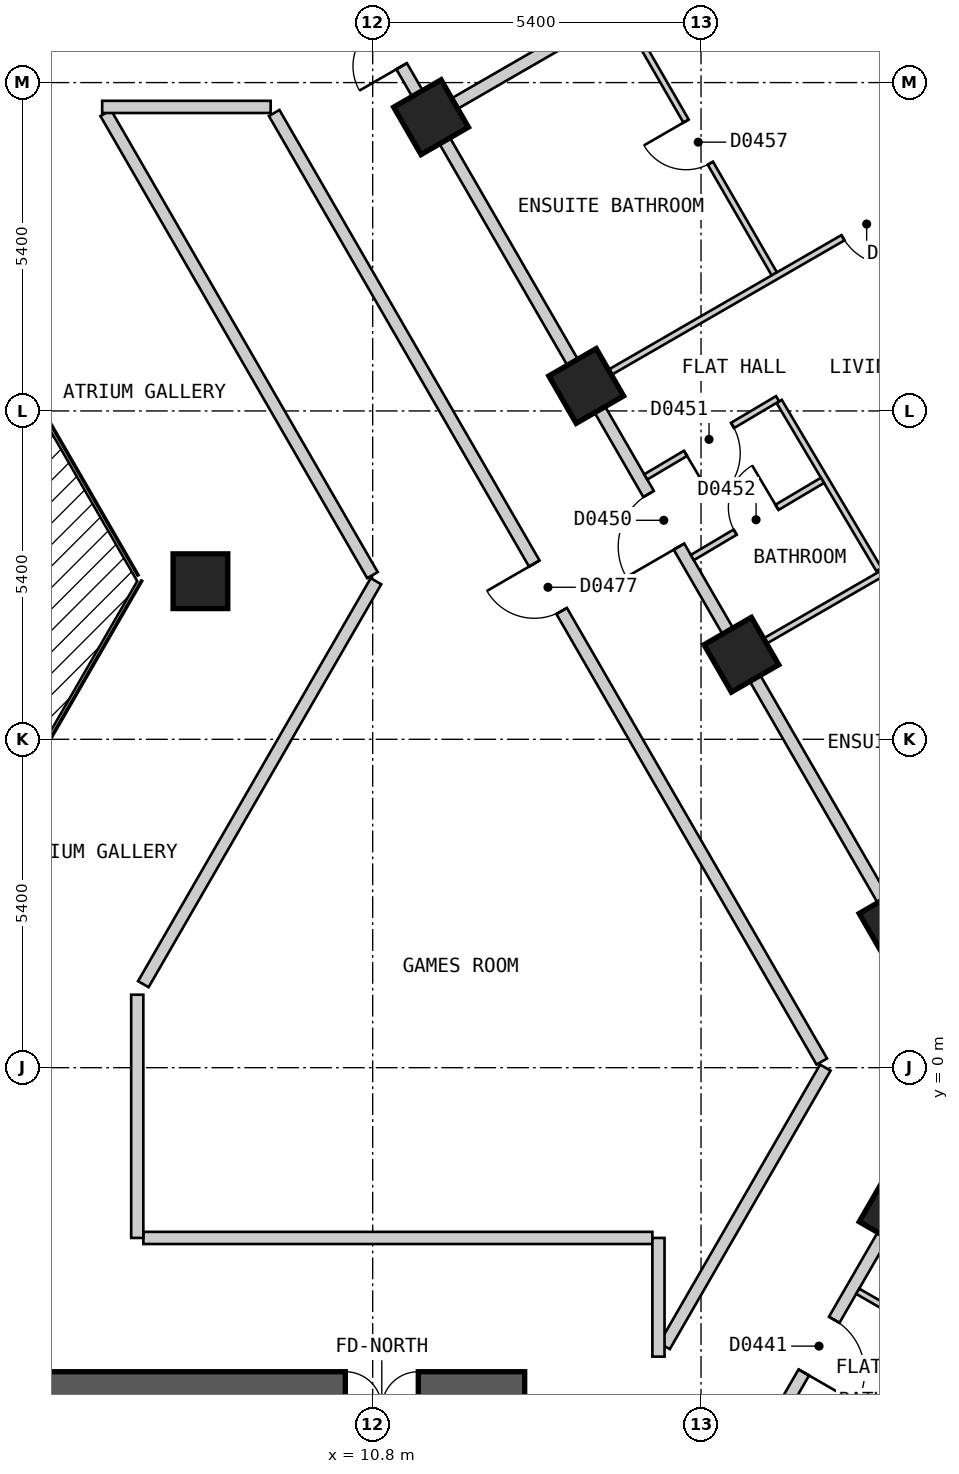
"""IFC4 building model, lengths in metres.
Left out: names, types, materials, properties, quantities, classifications, styles, units other than length and angle.
Written with IfcOpenShell. Run it as: python <this file> out.ifc"""

import sys

from ifc_helpers import new_model, si_unit, direction, frame, frame_2d, origin, origin_2d, place, context, subcontext, project, spatial, polyline, rectangle, outline, extrude, element, fill, save


model = new_model("IFC4")
c1 = context("Model", 3, precision=1e-05, world=origin(), true_north=direction((0.0, 1.0)))
c2 = subcontext(c1, "Body", "Model", "MODEL_VIEW")
j1 = project(units=[si_unit("LENGTHUNIT", "METRE"), si_unit("PLANEANGLEUNIT", "RADIAN")], contexts=[c1])
p1 = place(None, origin())
s1 = spatial("IfcSite", under=j1, at=p1, CompositionType="ELEMENT")
p2 = place(p1, origin())
s2 = spatial("IfcBuilding", under=s1, at=p2, CompositionType="ELEMENT")
p3 = place(p2, frame((0.0, 0.0, 32.4)))
s3 = spatial("IfcBuildingStorey", under=s2, at=p3, CompositionType="ELEMENT", Elevation=32.4)
for number, where, z_axis, x_axis in (
    (1, (19.417, -2.369, 0.0), (0.0, 0.0, 1.0), (0.5, 0.866, 0.0)),
    (2, (19.416, 2.371, 0.0), (0.0, 0.0, 1.0), (-0.5, 0.866, 0.0)),
    (3, (16.864, 6.791, 0.0), (0.0, 0.0, 1.0), (-0.5, 0.866, 0.0)),
    (4, (14.312, 11.211, 0.0), (0.0, 0.0, 1.0), (-0.5, 0.866, 0.0)),
    (5, (7.967, 8.0, 0.0), (0.0, 0.0, 1.0), (1.0, 0.0, 0.0)),
    (6, (11.76, 15.631, 0.0), (0.0, 0.0, 1.0), (-0.5, 0.866, 0.0)),
):
    element("IfcColumn", number, at=place(p3, frame(where, z_axis=z_axis, x_axis=x_axis)), inside=s3, PredefinedType="COLUMN", context=c2, shape_type="SweptSolid", body=[
        extrude(rectangle(XDim=0.9, YDim=0.9, at=origin_2d()), origin(), (0.0, 0.0, 1.0), 3.0),
    ])
p4 = place(p3, frame((-13.3, -5.6, 0.0), z_axis=(0.0, 0.0, 1.0), x_axis=(1.0, 0.0, 0.0)))
e7 = element("IfcWall", 7, at=p4, inside=s3, PredefinedType="SHEAR", context=c2, shape_type="SweptSolid", body=[
    extrude(rectangle(XDim=26.6, YDim=1.2, at=frame_2d((13.3, 0.0))), origin(), (0.0, 0.0, 1.0), 2.7),
])
p5 = place(p4, frame((23.65, 0.0, 0.0)))
e8 = element("IfcOpeningElement", 8, at=p5, cuts=e7, PredefinedType="OPENING", context=c2, shape_type="SweptSolid", body=[
    extrude(rectangle(XDim=1.2, YDim=2.1, at=frame_2d((0.6, 1.05))), frame((0.0, 0.61, 0.0), z_axis=(0.0, -1.0, 0.0), x_axis=(1.0, 0.0, 0.0)), (0.0, 0.0, 1.0), 1.22),
])
p6 = place(p3, frame((17.71, -25.825, 0.0), z_axis=(0.0, 0.0, 1.0), x_axis=(0.500001938803, 0.866024284413, 0.0)))
e9 = element("IfcWall", 9, at=p6, inside=s3, PredefinedType="SOLIDWALL", context=c2, shape_type="SweptSolid", body=[
    extrude(outline(polyline([(0.0, -0.15), (27.02, -0.15), (26.94, 0.15), (0.08, 0.15), (0.0, -0.15)])), origin(), (0.0, 0.0, 1.0), 2.7),
])
p7 = place(p6, frame((2.553, 0.0, 0.15)))
e10 = element("IfcOpeningElement", 10, at=p7, cuts=e9, PredefinedType="OPENING", context=c2, shape_type="SweptSolid", body=[
    extrude(rectangle(XDim=1.5, YDim=2.1, at=frame_2d((0.75, 1.05))), frame((0.0, 0.16, 0.0), z_axis=(0.0, -1.0, 0.0), x_axis=(1.0, 0.0, 0.0)), (0.0, 0.0, 1.0), 0.32),
])
p8 = place(p6, frame((7.658, 0.0, 0.15)))
e11 = element("IfcOpeningElement", 11, at=p8, cuts=e9, PredefinedType="OPENING", context=c2, shape_type="SweptSolid", body=[
    extrude(rectangle(XDim=1.5, YDim=2.1, at=frame_2d((0.75, 1.05))), frame((0.0, 0.16, 0.0), z_axis=(0.0, -1.0, 0.0), x_axis=(1.0, 0.0, 0.0)), (0.0, 0.0, 1.0), 0.32),
])
p9 = place(p6, frame((12.761, 0.0, 0.15)))
e12 = element("IfcOpeningElement", 12, at=p9, cuts=e9, PredefinedType="OPENING", context=c2, shape_type="SweptSolid", body=[
    extrude(rectangle(XDim=1.5, YDim=2.1, at=frame_2d((0.75, 1.05))), frame((0.0, 0.16, 0.0), z_axis=(0.0, -1.0, 0.0), x_axis=(1.0, 0.0, 0.0)), (0.0, 0.0, 1.0), 0.32),
])
p10 = place(p6, frame((17.865, 0.0, 0.15)))
e13 = element("IfcOpeningElement", 13, at=p10, cuts=e9, PredefinedType="OPENING", context=c2, shape_type="SweptSolid", body=[
    extrude(rectangle(XDim=1.5, YDim=2.1, at=frame_2d((0.75, 1.05))), frame((0.0, 0.16, 0.0), z_axis=(0.0, -1.0, 0.0), x_axis=(1.0, 0.0, 0.0)), (0.0, 0.0, 1.0), 0.32),
])
p11 = place(p6, frame((22.969, 0.0, 0.15)))
e14 = element("IfcOpeningElement", 14, at=p11, cuts=e9, PredefinedType="OPENING", context=c2, shape_type="SweptSolid", body=[
    extrude(rectangle(XDim=1.5, YDim=2.1, at=frame_2d((0.75, 1.05))), frame((0.0, 0.16, 0.0), z_axis=(0.0, -1.0, 0.0), x_axis=(1.0, 0.0, 0.0)), (0.0, 0.0, 1.0), 0.32),
])
p12 = place(p3, frame((31.22, 2.425, 0.0), z_axis=(0.0, 0.0, 1.0), x_axis=(-0.500001938803, 0.866024284413, 0.0)))
e15 = element("IfcWall", 15, at=p12, inside=s3, PredefinedType="SOLIDWALL", context=c2, shape_type="SweptSolid", body=[
    extrude(outline(polyline([(0.0, -0.15), (27.02, -0.15), (26.94, 0.15), (0.08, 0.15), (0.0, -0.15)])), origin(), (0.0, 0.0, 1.0), 2.7),
])
p13 = place(p12, frame((2.553, 0.0, 0.15)))
e16 = element("IfcOpeningElement", 16, at=p13, cuts=e15, PredefinedType="OPENING", context=c2, shape_type="SweptSolid", body=[
    extrude(rectangle(XDim=1.5, YDim=2.1, at=frame_2d((0.75, 1.05))), frame((0.0, 0.16, 0.0), z_axis=(0.0, -1.0, 0.0), x_axis=(1.0, 0.0, 0.0)), (0.0, 0.0, 1.0), 0.32),
])
p14 = place(p12, frame((7.657, 0.0, 0.15)))
e17 = element("IfcOpeningElement", 17, at=p14, cuts=e15, PredefinedType="OPENING", context=c2, shape_type="SweptSolid", body=[
    extrude(rectangle(XDim=1.5, YDim=2.1, at=frame_2d((0.75, 1.05))), frame((0.0, 0.16, 0.0), z_axis=(0.0, -1.0, 0.0), x_axis=(1.0, 0.0, 0.0)), (0.0, 0.0, 1.0), 0.32),
])
p15 = place(p12, frame((12.761, 0.0, 0.15)))
e18 = element("IfcOpeningElement", 18, at=p15, cuts=e15, PredefinedType="OPENING", context=c2, shape_type="SweptSolid", body=[
    extrude(rectangle(XDim=1.5, YDim=2.1, at=frame_2d((0.75, 1.05))), frame((0.0, 0.16, 0.0), z_axis=(0.0, -1.0, 0.0), x_axis=(1.0, 0.0, 0.0)), (0.0, 0.0, 1.0), 0.32),
])
p16 = place(p12, frame((17.865, 0.0, 0.15)))
e19 = element("IfcOpeningElement", 19, at=p16, cuts=e15, PredefinedType="OPENING", context=c2, shape_type="SweptSolid", body=[
    extrude(rectangle(XDim=1.5, YDim=2.1, at=frame_2d((0.75, 1.05))), frame((0.0, 0.16, 0.0), z_axis=(0.0, -1.0, 0.0), x_axis=(1.0, 0.0, 0.0)), (0.0, 0.0, 1.0), 0.32),
])
p17 = place(p12, frame((22.969, 0.0, 0.15)))
e20 = element("IfcOpeningElement", 20, at=p17, cuts=e15, PredefinedType="OPENING", context=c2, shape_type="SweptSolid", body=[
    extrude(rectangle(XDim=1.5, YDim=2.1, at=frame_2d((0.75, 1.05))), frame((0.0, 0.16, 0.0), z_axis=(0.0, -1.0, 0.0), x_axis=(1.0, 0.0, 0.0)), (0.0, 0.0, 1.0), 0.32),
])
p18 = place(p3, frame((6.409, 15.7, 0.0), z_axis=(0.0, 0.0, 1.0), x_axis=(0.499930377127, -0.866065596838, 0.0)))
e21 = element("IfcWall", 21, at=p18, inside=s3, PredefinedType="PARTITIONING", context=c2, shape_type="SweptSolid", body=[
    extrude(rectangle(XDim=8.775, YDim=0.2, at=frame_2d((4.388, 0.0))), origin(), (0.0, 0.0, 1.0), 2.7),
])
p19 = place(p3, frame((9.18, 15.7, 0.0), z_axis=(0.0, 0.0, 1.0), x_axis=(0.500003652032, -0.866023295272, 0.0)))
e22 = element("IfcWall", 22, at=p19, inside=s3, PredefinedType="PARTITIONING", context=c2, shape_type="SweptSolid", body=[
    extrude(rectangle(XDim=18.012, YDim=0.2, at=frame_2d((9.006, 0.0))), origin(), (0.0, 0.0, 1.0), 2.7),
])
p20 = place(p19, frame((8.556, 0.0, 0.0)))
e23 = element("IfcOpeningElement", 23, at=p20, cuts=e22, PredefinedType="OPENING", context=c2, shape_type="SweptSolid", body=[
    extrude(rectangle(XDim=0.9, YDim=2.1, at=frame_2d((0.45, 1.05))), frame((0.0, 0.11, 0.0), z_axis=(0.0, -1.0, 0.0), x_axis=(1.0, 0.0, 0.0)), (0.0, 0.0, 1.0), 0.22),
])
p21 = place(p3, frame((10.45, 17.9, 0.0), z_axis=(0.0, 0.0, 1.0), x_axis=(0.500034352617, -0.866005569383, 0.0)))
e24 = element("IfcWall", 24, at=p21, inside=s3, PredefinedType="PARTITIONING", context=c2, shape_type="SweptSolid", body=[
    extrude(rectangle(XDim=20.553, YDim=0.2, at=frame_2d((10.276, 0.0))), origin(), (0.0, 0.0, 1.0), 2.7),
])
p22 = place(p21, frame((9.775, 0.0, 0.0)))
e25 = element("IfcOpeningElement", 25, at=p22, cuts=e24, PredefinedType="OPENING", context=c2, shape_type="SweptSolid", body=[
    extrude(rectangle(XDim=1.0, YDim=2.1, at=frame_2d((0.5, 1.05))), frame((0.0, 0.11, 0.0), z_axis=(0.0, -1.0, 0.0), x_axis=(1.0, 0.0, 0.0)), (0.0, 0.0, 1.0), 0.22),
])
p23 = place(p21, frame((0.852, 0.0, 0.0)))
e26 = element("IfcOpeningElement", 26, at=p23, cuts=e24, PredefinedType="OPENING", context=c2, shape_type="SweptSolid", body=[
    extrude(rectangle(XDim=0.8, YDim=2.1, at=frame_2d((0.4, 1.05))), frame((0.0, 0.11, 0.0), z_axis=(0.0, -1.0, 0.0), x_axis=(1.0, 0.0, 0.0)), (0.0, 0.0, 1.0), 0.22),
])
p24 = place(p3, frame((7.028, -2.8, 0.0), z_axis=(0.0, 0.0, 1.0), x_axis=(1.0, 0.0, 0.0)))
e27 = element("IfcWall", 27, at=p24, inside=s3, PredefinedType="PARTITIONING", context=c2, shape_type="SweptSolid", body=[
    extrude(rectangle(XDim=8.372, YDim=0.2, at=frame_2d((4.186, 0.0))), origin(), (0.0, 0.0, 1.0), 2.7),
])
p25 = place(p3, frame((6.351, 15.8, 0.0), z_axis=(0.0, 0.0, 1.0), x_axis=(1.0, 0.0, 0.0)))
e28 = element("IfcWall", 28, at=p25, inside=s3, PredefinedType="PARTITIONING", context=c2, shape_type="SweptSolid", body=[
    extrude(rectangle(XDim=2.771, YDim=0.2, at=frame_2d((1.385, 0.0))), origin(), (0.0, 0.0, 1.0), 2.7),
])
p26 = place(p3, frame((7.028, 1.373, 0.0), z_axis=(0.0, 0.0, 1.0), x_axis=(0.49998574534, 0.86603363356, 0.0)))
e29 = element("IfcWall", 29, at=p26, inside=s3, PredefinedType="PARTITIONING", context=c2, shape_type="SweptSolid", body=[
    extrude(rectangle(XDim=7.652, YDim=0.2, at=frame_2d((3.826, 0.0))), origin(), (0.0, 0.0, 1.0), 2.7),
])
p27 = place(p3, frame((15.6, -4.579, 0.0), z_axis=(0.0, 0.0, 1.0), x_axis=(0.499927597274, 0.866067201483, 0.0)))
e30 = element("IfcWall", 30, at=p27, inside=s3, PredefinedType="PARTITIONING", context=c2, shape_type="SweptSolid", body=[
    extrude(rectangle(XDim=5.288, YDim=0.2, at=frame_2d((2.644, 0.0))), origin(), (0.0, 0.0, 1.0), 2.7),
])
p28 = place(p3, frame((15.707, -8.794, 0.0), z_axis=(0.0, 0.0, 1.0), x_axis=(0.500016151272, 0.866016078642, 0.0)))
e31 = element("IfcWall", 31, at=p28, inside=s3, PredefinedType="PARTITIONING", context=c2, shape_type="SweptSolid", body=[
    extrude(rectangle(XDim=10.098, YDim=0.2, at=frame_2d((5.049, 0.0))), origin(), (0.0, 0.0, 1.0), 2.7),
])
p29 = place(p28, frame((4.367, 0.0, 0.0)))
e32 = element("IfcOpeningElement", 32, at=p29, cuts=e31, PredefinedType="OPENING", context=c2, shape_type="SweptSolid", body=[
    extrude(rectangle(XDim=1.0, YDim=2.1, at=frame_2d((0.5, 1.05))), frame((0.0, 0.11, 0.0), z_axis=(0.0, -1.0, 0.0), x_axis=(1.0, 0.0, 0.0)), (0.0, 0.0, 1.0), 0.22),
])
p30 = place(p3, frame((6.928, -2.8, 0.0), z_axis=(0.0, 0.0, 1.0), x_axis=(0.0, 1.0, 0.0)))
e33 = element("IfcWall", 33, at=p30, inside=s3, PredefinedType="PARTITIONING", context=c2, shape_type="SweptSolid", body=[
    extrude(rectangle(XDim=4.0, YDim=0.2, at=frame_2d((2.0, 0.0))), origin(), (0.0, 0.0, 1.0), 2.7),
])
p31 = place(p3, frame((15.5, -4.752, 0.0), z_axis=(0.0, 0.0, 1.0), x_axis=(0.0, 1.0, 0.0)))
e34 = element("IfcWall", 34, at=p31, inside=s3, PredefinedType="PARTITIONING", context=c2, shape_type="SweptSolid", body=[
    extrude(rectangle(XDim=1.952, YDim=0.2, at=frame_2d((0.976, 0.0))), origin(), (0.0, 0.0, 1.0), 2.7),
])
p32 = place(p3, frame((17.485, 10.957, 0.0), z_axis=(0.0, 0.0, 1.0), x_axis=(0.510324709283, -0.859981796956, 0.0)))
e35 = element("IfcWall", 35, at=p32, inside=s3, PredefinedType="PARTITIONING", context=c2, shape_type="SweptSolid", body=[
    extrude(rectangle(XDim=3.215, YDim=0.1, at=frame_2d((1.608, 0.0))), origin(), (0.0, 0.0, 1.0), 2.7),
])
p33 = place(p3, frame((14.928, 17.344, 0.0), z_axis=(0.0, 0.0, 1.0), x_axis=(0.500029609304, -0.86600830817, 0.0)))
e36 = element("IfcWall", 36, at=p33, inside=s3, PredefinedType="PARTITIONING", context=c2, shape_type="SweptSolid", body=[
    extrude(rectangle(XDim=4.954, YDim=0.1, at=frame_2d((2.477, 0.0))), origin(), (0.0, 0.0, 1.0), 2.7),
])
p34 = place(p33, frame((2.052, 0.0, 0.0)))
e37 = element("IfcOpeningElement", 37, at=p34, cuts=e36, PredefinedType="OPENING", context=c2, shape_type="SweptSolid", body=[
    extrude(rectangle(XDim=0.8, YDim=2.1, at=frame_2d((0.4, 1.05))), frame((0.0, 0.06, 0.0), z_axis=(0.0, -1.0, 0.0), x_axis=(1.0, 0.0, 0.0)), (0.0, 0.0, 1.0), 0.12),
])
p35 = place(p3, frame((18.777, -3.677, 0.0), z_axis=(0.0, 0.0, 1.0), x_axis=(0.866000843773, -0.500042536776, 0.0)))
e38 = element("IfcWall", 38, at=p35, inside=s3, PredefinedType="PARTITIONING", context=c2, shape_type="SweptSolid", body=[
    extrude(rectangle(XDim=4.05, YDim=0.1, at=frame_2d((2.025, 0.0))), origin(), (0.0, 0.0, 1.0), 2.7),
])
p36 = place(p35, frame((1.55, 0.0, 0.0)))
e39 = element("IfcOpeningElement", 39, at=p36, cuts=e38, PredefinedType="OPENING", context=c2, shape_type="SweptSolid", body=[
    extrude(rectangle(XDim=0.9, YDim=2.1, at=frame_2d((0.45, 1.05))), frame((0.0, 0.06, 0.0), z_axis=(0.0, -1.0, 0.0), x_axis=(1.0, 0.0, 0.0)), (0.0, 0.0, 1.0), 0.12),
])
p37 = place(p3, frame((16.95, 6.841, 0.0), z_axis=(0.0, 0.0, 1.0), x_axis=(0.866022959057, 0.500004234368, 0.0)))
e40 = element("IfcWall", 40, at=p37, inside=s3, PredefinedType="PARTITIONING", context=c2, shape_type="SweptSolid", body=[
    extrude(rectangle(XDim=10.0, YDim=0.1, at=frame_2d((5.0, 0.0))), origin(), (0.0, 0.0, 1.0), 2.7),
])
p38 = place(p37, frame((4.795, 0.0, 0.0)))
e41 = element("IfcOpeningElement", 41, at=p38, cuts=e40, PredefinedType="OPENING", context=c2, shape_type="SweptSolid", body=[
    extrude(rectangle(XDim=0.9, YDim=2.1, at=frame_2d((0.45, 1.05))), frame((0.0, 0.06, 0.0), z_axis=(0.0, -1.0, 0.0), x_axis=(1.0, 0.0, 0.0)), (0.0, 0.0, 1.0), 0.12),
])
p39 = place(p3, frame((14.399, 11.261, 0.0), z_axis=(0.0, 0.0, 1.0), x_axis=(0.866022959057, 0.500004234368, 0.0)))
e42 = element("IfcWall", 42, at=p39, inside=s3, PredefinedType="PARTITIONING", context=c2, shape_type="SweptSolid", body=[
    extrude(rectangle(XDim=10.0, YDim=0.1, at=frame_2d((5.0, 0.0))), origin(), (0.0, 0.0, 1.0), 2.7),
])
p40 = place(p39, frame((4.775, 0.0, 0.0)))
e43 = element("IfcOpeningElement", 43, at=p40, cuts=e42, PredefinedType="OPENING", context=c2, shape_type="SweptSolid", body=[
    extrude(rectangle(XDim=0.9, YDim=2.1, at=frame_2d((0.45, 1.05))), frame((0.0, 0.06, 0.0), z_axis=(0.0, -1.0, 0.0), x_axis=(1.0, 0.0, 0.0)), (0.0, 0.0, 1.0), 0.12),
])
p41 = place(p3, frame((16.057, 8.389, 0.0), z_axis=(0.0, 0.0, 1.0), x_axis=(0.860077993161, 0.510162567893, 0.0)))
e44 = element("IfcWall", 44, at=p41, inside=s3, PredefinedType="PARTITIONING", context=c2, shape_type="SweptSolid", body=[
    extrude(rectangle(XDim=2.49, YDim=0.1, at=frame_2d((1.245, 0.0))), origin(), (0.0, 0.0, 1.0), 2.7),
])
p42 = place(p41, frame((0.819, 0.0, 0.0)))
e45 = element("IfcOpeningElement", 45, at=p42, cuts=e44, PredefinedType="OPENING", context=c2, shape_type="SweptSolid", body=[
    extrude(rectangle(XDim=0.8, YDim=2.1, at=frame_2d((0.4, 1.05))), frame((0.0, 0.06, 0.0), z_axis=(0.0, -1.0, 0.0), x_axis=(1.0, 0.0, 0.0)), (0.0, 0.0, 1.0), 0.12),
])
p43 = place(p3, frame((15.291, 9.715, 0.0), z_axis=(0.0, 0.0, 1.0), x_axis=(0.860088508644, 0.51014483953, 0.0)))
e46 = element("IfcWall", 46, at=p43, inside=s3, PredefinedType="PARTITIONING", context=c2, shape_type="SweptSolid", body=[
    extrude(rectangle(XDim=2.521, YDim=0.1, at=frame_2d((1.26, 0.0))), origin(), (0.0, 0.0, 1.0), 2.7),
])
p44 = place(p43, frame((0.76, 0.0, 0.0)))
e47 = element("IfcOpeningElement", 47, at=p44, cuts=e46, PredefinedType="OPENING", context=c2, shape_type="SweptSolid", body=[
    extrude(rectangle(XDim=0.9, YDim=2.1, at=frame_2d((0.45, 1.05))), frame((0.0, 0.06, 0.0), z_axis=(0.0, -1.0, 0.0), x_axis=(1.0, 0.0, 0.0)), (0.0, 0.0, 1.0), 0.12),
])
p45 = place(p3, frame((11.847, 15.681, 0.0), z_axis=(0.0, 0.0, 1.0), x_axis=(0.866022959057, 0.500004234368, 0.0)))
e48 = element("IfcWall", 48, at=p45, inside=s3, PredefinedType="PARTITIONING", context=c2, shape_type="SweptSolid", body=[
    extrude(rectangle(XDim=10.0, YDim=0.2, at=frame_2d((5.0, 0.0))), origin(), (0.0, 0.0, 1.0), 2.7),
])
p46 = place(p29, origin())
e49 = element("IfcDoor", 49, at=p46, inside=s3, OperationType="SINGLE_SWING_LEFT", PredefinedType="DOOR", context=c2, shape_type="SweptSolid", body=[
    extrude(rectangle(XDim=1.0, YDim=2.1, at=frame_2d((0.5, 1.05))), frame((0.0, 0.025, 0.0), z_axis=(0.0, -1.0, 0.0), x_axis=(1.0, 0.0, 0.0)), (0.0, 0.0, 1.0), 0.05),
])
fill(e32, e49)
p47 = place(p22, origin())
e50 = element("IfcDoor", 50, at=p47, inside=s3, OperationType="SINGLE_SWING_RIGHT", PredefinedType="DOOR", context=c2, shape_type="SweptSolid", body=[
    extrude(rectangle(XDim=1.0, YDim=2.1, at=frame_2d((0.5, 1.05))), frame((0.0, 0.025, 0.0), z_axis=(0.0, -1.0, 0.0), x_axis=(1.0, 0.0, 0.0)), (0.0, 0.0, 1.0), 0.05),
])
fill(e25, e50)
p48 = place(p44, origin())
e51 = element("IfcDoor", 51, at=p48, inside=s3, OperationType="SINGLE_SWING_LEFT", PredefinedType="DOOR", context=c2, shape_type="SweptSolid", body=[
    extrude(rectangle(XDim=0.9, YDim=2.1, at=frame_2d((0.45, 1.05))), frame((0.0, 0.025, 0.0), z_axis=(0.0, -1.0, 0.0), x_axis=(1.0, 0.0, 0.0)), (0.0, 0.0, 1.0), 0.05),
])
fill(e47, e51)
p49 = place(p42, origin())
e52 = element("IfcDoor", 52, at=p49, inside=s3, OperationType="SINGLE_SWING_RIGHT", PredefinedType="DOOR", context=c2, shape_type="SweptSolid", body=[
    extrude(rectangle(XDim=0.8, YDim=2.1, at=frame_2d((0.4, 1.05))), frame((0.0, 0.025, 0.0), z_axis=(0.0, -1.0, 0.0), x_axis=(1.0, 0.0, 0.0)), (0.0, 0.0, 1.0), 0.05),
])
fill(e45, e52)
p50 = place(p40, origin())
e53 = element("IfcDoor", 53, at=p50, inside=s3, OperationType="SINGLE_SWING_RIGHT", PredefinedType="DOOR", context=c2, shape_type="SweptSolid", body=[
    extrude(rectangle(XDim=0.9, YDim=2.1, at=frame_2d((0.45, 1.05))), frame((0.0, 0.025, 0.0), z_axis=(0.0, -1.0, 0.0), x_axis=(1.0, 0.0, 0.0)), (0.0, 0.0, 1.0), 0.05),
])
fill(e43, e53)
p51 = place(p34, origin())
e54 = element("IfcDoor", 54, at=p51, inside=s3, OperationType="SINGLE_SWING_LEFT", PredefinedType="DOOR", context=c2, shape_type="SweptSolid", body=[
    extrude(rectangle(XDim=0.8, YDim=2.1, at=frame_2d((0.4, 1.05))), frame((0.0, 0.025, 0.0), z_axis=(0.0, -1.0, 0.0), x_axis=(1.0, 0.0, 0.0)), (0.0, 0.0, 1.0), 0.05),
])
fill(e37, e54)
p52 = place(p23, origin())
e55 = element("IfcDoor", 55, at=p52, inside=s3, OperationType="SINGLE_SWING_RIGHT", PredefinedType="DOOR", context=c2, shape_type="SweptSolid", body=[
    extrude(rectangle(XDim=0.8, YDim=2.1, at=frame_2d((0.4, 1.05))), frame((0.0, 0.025, 0.0), z_axis=(0.0, -1.0, 0.0), x_axis=(1.0, 0.0, 0.0)), (0.0, 0.0, 1.0), 0.05),
])
fill(e26, e55)
p53 = place(p20, origin())
e56 = element("IfcDoor", 56, at=p53, inside=s3, OperationType="SINGLE_SWING_LEFT", PredefinedType="DOOR", context=c2, shape_type="SweptSolid", body=[
    extrude(rectangle(XDim=0.9, YDim=2.1, at=frame_2d((0.45, 1.05))), frame((0.0, 0.025, 0.0), z_axis=(0.0, -1.0, 0.0), x_axis=(1.0, 0.0, 0.0)), (0.0, 0.0, 1.0), 0.05),
])
fill(e23, e56)
save(model, sys.argv[1])
